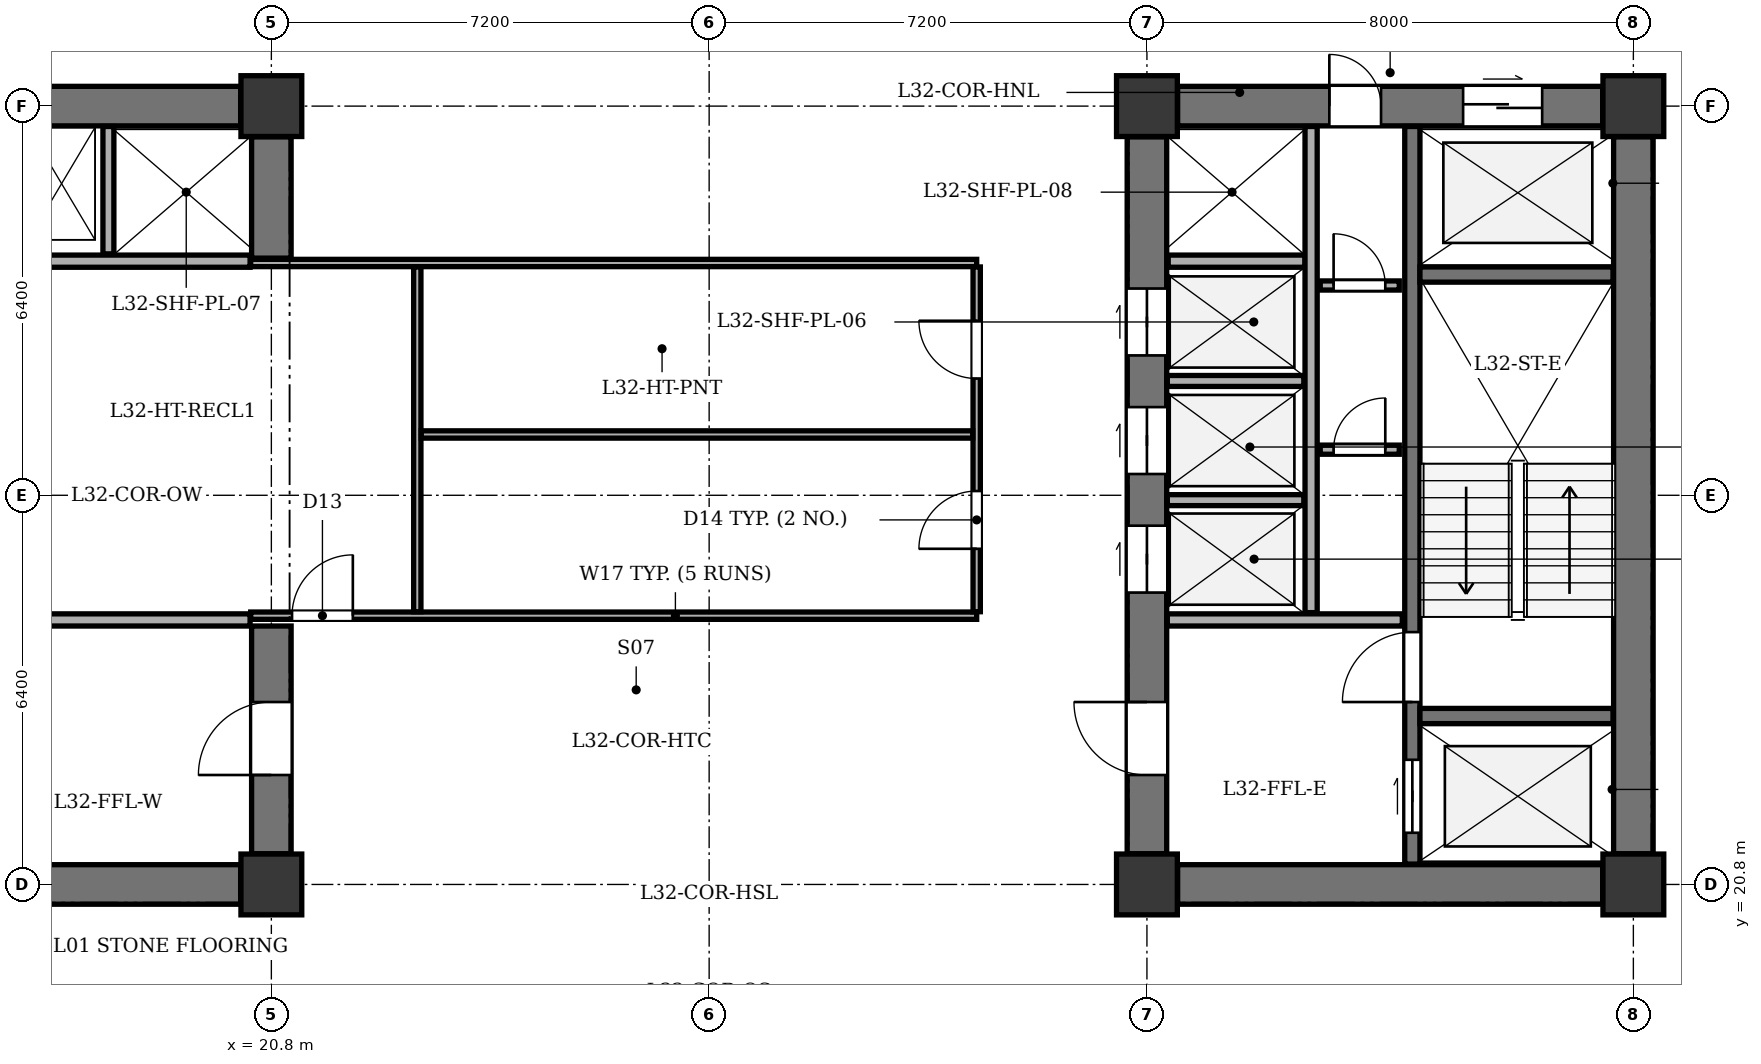
"""IFC4 building model, lengths in metres.
Left out: names, types, materials, properties, quantities, classifications, styles, units other than length and angle.
Written with IfcOpenShell. Run it as: python <this file> out.ifc"""

import sys

from ifc_helpers import new_model, si_unit, direction, frame, frame_2d, origin, origin_2d, place, context, subcontext, project, spatial, rectangle, extrude, element, fill, save


model = new_model("IFC4")
c1 = context("Model", 3, precision=1e-05, world=origin(), true_north=direction((0.0, 1.0)))
c2 = subcontext(c1, "Body", "Model", "MODEL_VIEW")
j1 = project(units=[si_unit("LENGTHUNIT", "METRE"), si_unit("PLANEANGLEUNIT", "RADIAN")], contexts=[c1])
p1 = place(None, origin())
s1 = spatial("IfcSite", under=j1, at=p1, CompositionType="ELEMENT")
p2 = place(p1, origin())
s2 = spatial("IfcBuilding", under=s1, at=p2, CompositionType="ELEMENT")
p3 = place(p2, frame((0.0, 0.0, 130.8)))
s3 = spatial("IfcBuildingStorey", under=s2, at=p3, CompositionType="ELEMENT", Elevation=130.8)
for number, where, z_axis, x_axis in (
    (1, (20.8, 20.8, 0.0), (0.0, 0.0, 1.0), (1.0, 0.0, 0.0)),
    (2, (20.8, 33.6, 0.0), (0.0, 0.0, 1.0), (1.0, 0.0, 0.0)),
    (3, (35.2, 20.8, 0.0), (0.0, 0.0, 1.0), (1.0, 0.0, 0.0)),
    (4, (43.2, 20.8, 0.0), (0.0, 0.0, 1.0), (1.0, 0.0, 0.0)),
    (5, (35.2, 33.6, 0.0), (0.0, 0.0, 1.0), (1.0, 0.0, 0.0)),
    (6, (43.2, 33.6, 0.0), (0.0, 0.0, 1.0), (1.0, 0.0, 0.0)),
):
    element("IfcColumn", number, at=place(p3, frame(where, z_axis=z_axis, x_axis=x_axis)), inside=s3, PredefinedType="COLUMN", context=c2, shape_type="SweptSolid", body=[
        extrude(rectangle(XDim=1.0, YDim=1.0, at=origin_2d()), origin(), (0.0, 0.0, 1.0), 3.5),
    ])
p4 = place(p3, frame((13.305, 20.8, 0.0), z_axis=(0.0, 0.0, 1.0), x_axis=(1.0, 0.0, 0.0)))
e7 = element("IfcWall", 7, at=p4, inside=s3, PredefinedType="SHEAR", context=c2, shape_type="SweptSolid", body=[
    extrude(rectangle(XDim=6.99, YDim=0.65, at=frame_2d((3.495, 0.0))), origin(), (0.0, 0.0, 1.0), 3.2),
])
p5 = place(p3, frame((13.305, 33.6, 0.0), z_axis=(0.0, 0.0, 1.0), x_axis=(1.0, 0.0, 0.0)))
e8 = element("IfcWall", 8, at=p5, inside=s3, PredefinedType="SHEAR", context=c2, shape_type="SweptSolid", body=[
    extrude(rectangle(XDim=6.99, YDim=0.65, at=frame_2d((3.495, 0.0))), origin(), (0.0, 0.0, 1.0), 3.2),
])
p6 = place(p5, frame((0.395, 0.0, 0.0)))
e9 = element("IfcOpeningElement", 9, at=p6, cuts=e8, PredefinedType="OPENING", context=c2, shape_type="SweptSolid", body=[
    extrude(rectangle(XDim=0.85, YDim=2.02, at=frame_2d((0.425, 1.01))), frame((0.0, 0.335, 0.0), z_axis=(0.0, -1.0, 0.0), x_axis=(1.0, 0.0, 0.0)), (0.0, 0.0, 1.0), 0.67),
])
p7 = place(p5, frame((1.695, 0.0, 0.0)))
e10 = element("IfcOpeningElement", 10, at=p7, cuts=e8, PredefinedType="OPENING", context=c2, shape_type="SweptSolid", body=[
    extrude(rectangle(XDim=0.85, YDim=2.02, at=frame_2d((0.425, 1.01))), frame((0.0, 0.335, 0.0), z_axis=(0.0, -1.0, 0.0), x_axis=(1.0, 0.0, 0.0)), (0.0, 0.0, 1.0), 0.67),
])
p8 = place(p3, frame((20.8, 21.305, 0.0), z_axis=(0.0, 0.0, 1.0), x_axis=(0.0, 1.0, 0.0)))
e11 = element("IfcWall", 11, at=p8, inside=s3, PredefinedType="SHEAR", context=c2, shape_type="SweptSolid", body=[
    extrude(rectangle(XDim=3.745, YDim=0.65, at=frame_2d((1.873, 0.0))), origin(), (0.0, 0.0, 1.0), 3.2),
])
p9 = place(p8, frame((1.295, 0.0, 0.0)))
e12 = element("IfcOpeningElement", 12, at=p9, cuts=e11, PredefinedType="OPENING", context=c2, shape_type="SweptSolid", body=[
    extrude(rectangle(XDim=1.2, YDim=2.15, at=frame_2d((0.6, 1.075))), frame((0.0, 0.335, 0.0), z_axis=(0.0, -1.0, 0.0), x_axis=(1.0, 0.0, 0.0)), (0.0, 0.0, 1.0), 0.67),
])
p10 = place(p3, frame((20.8, 31.1, 0.0), z_axis=(0.0, 0.0, 1.0), x_axis=(0.0, 1.0, 0.0)))
e13 = element("IfcWall", 13, at=p10, inside=s3, PredefinedType="SHEAR", context=c2, shape_type="SweptSolid", body=[
    extrude(rectangle(XDim=1.995, YDim=0.65, at=frame_2d((0.998, 0.0))), origin(), (0.0, 0.0, 1.0), 3.2),
])
for number, where, z_axis, x_axis in (
    (14, (16.6, 25.15, 0.0), (0.0, 0.0, 1.0), (1.0, 0.0, 0.0)),
    (15, (16.6, 31.05, 0.0), (0.0, 0.0, 1.0), (1.0, 0.0, 0.0)),
):
    element("IfcWall", number, at=place(p3, frame(where, z_axis=z_axis, x_axis=x_axis)), inside=s3, PredefinedType="SOLIDWALL", context=c2, shape_type="SweptSolid", body=[
        extrude(rectangle(XDim=3.85, YDim=0.2, at=frame_2d((1.925, 0.0))), origin(), (0.0, 0.0, 1.0), 3.2),
    ])
p11 = place(p3, frame((18.12, 31.17, 0.0), z_axis=(0.0, 0.0, 1.0), x_axis=(0.0, 1.0, 0.0)))
e16 = element("IfcWall", 16, at=p11, inside=s3, PredefinedType="PARTITIONING", context=c2, shape_type="SweptSolid", body=[
    extrude(rectangle(XDim=2.095, YDim=0.18, at=frame_2d((1.047, 0.0))), origin(), (0.0, 0.0, 1.0), 3.2),
])
p12 = place(p3, frame((43.2, 21.305, 0.0), z_axis=(0.0, 0.0, 1.0), x_axis=(0.0, 1.0, 0.0)))
e17 = element("IfcWall", 17, at=p12, inside=s3, PredefinedType="SHEAR", context=c2, shape_type="SweptSolid", body=[
    extrude(rectangle(XDim=11.79, YDim=0.65, at=frame_2d((5.895, 0.0))), origin(), (0.0, 0.0, 1.0), 3.2),
])
p13 = place(p3, frame((35.705, 20.8, 0.0), z_axis=(0.0, 0.0, 1.0), x_axis=(1.0, 0.0, 0.0)))
e18 = element("IfcWall", 18, at=p13, inside=s3, PredefinedType="SHEAR", context=c2, shape_type="SweptSolid", body=[
    extrude(rectangle(XDim=6.99, YDim=0.65, at=frame_2d((3.495, 0.0))), origin(), (0.0, 0.0, 1.0), 3.2),
])
p14 = place(p3, frame((35.705, 33.6, 0.0), z_axis=(0.0, 0.0, 1.0), x_axis=(1.0, 0.0, 0.0)))
e19 = element("IfcWall", 19, at=p14, inside=s3, PredefinedType="SHEAR", context=c2, shape_type="SweptSolid", body=[
    extrude(rectangle(XDim=6.99, YDim=0.65, at=frame_2d((3.495, 0.0))), origin(), (0.0, 0.0, 1.0), 3.2),
])
p15 = place(p14, frame((4.695, 0.0, 0.0)))
e20 = element("IfcOpeningElement", 20, at=p15, cuts=e19, PredefinedType="OPENING", context=c2, shape_type="SweptSolid", body=[
    extrude(rectangle(XDim=1.3, YDim=2.15, at=frame_2d((0.65, 1.075))), frame((0.0, 0.335, 0.0), z_axis=(0.0, -1.0, 0.0), x_axis=(1.0, 0.0, 0.0)), (0.0, 0.0, 1.0), 0.67),
])
p16 = place(p14, frame((2.495, 0.0, 0.0)))
e21 = element("IfcOpeningElement", 21, at=p16, cuts=e19, PredefinedType="OPENING", context=c2, shape_type="SweptSolid", body=[
    extrude(rectangle(XDim=0.85, YDim=2.02, at=frame_2d((0.425, 1.01))), frame((0.0, 0.335, 0.0), z_axis=(0.0, -1.0, 0.0), x_axis=(1.0, 0.0, 0.0)), (0.0, 0.0, 1.0), 0.67),
])
p17 = place(p3, frame((35.2, 21.305, 0.0), z_axis=(0.0, 0.0, 1.0), x_axis=(0.0, 1.0, 0.0)))
e22 = element("IfcWall", 22, at=p17, inside=s3, PredefinedType="SHEAR", context=c2, shape_type="SweptSolid", body=[
    extrude(rectangle(XDim=11.79, YDim=0.65, at=frame_2d((5.895, 0.0))), origin(), (0.0, 0.0, 1.0), 3.2),
])
p18 = place(p17, frame((1.295, 0.0, 0.0)))
e23 = element("IfcOpeningElement", 23, at=p18, cuts=e22, PredefinedType="OPENING", context=c2, shape_type="SweptSolid", body=[
    extrude(rectangle(XDim=1.2, YDim=2.15, at=frame_2d((0.6, 1.075))), frame((0.0, 0.335, 0.0), z_axis=(0.0, -1.0, 0.0), x_axis=(1.0, 0.0, 0.0)), (0.0, 0.0, 1.0), 0.67),
])
p19 = place(p17, frame((4.295, 0.0, 0.0)))
e24 = element("IfcOpeningElement", 24, at=p19, cuts=e22, PredefinedType="OPENING", context=c2, shape_type="SweptSolid", body=[
    extrude(rectangle(XDim=1.1, YDim=2.1, at=frame_2d((0.55, 1.05))), frame((0.0, 0.335, 0.0), z_axis=(0.0, -1.0, 0.0), x_axis=(1.0, 0.0, 0.0)), (0.0, 0.0, 1.0), 0.67),
])
p20 = place(p17, frame((6.245, 0.0, 0.0)))
e25 = element("IfcOpeningElement", 25, at=p20, cuts=e22, PredefinedType="OPENING", context=c2, shape_type="SweptSolid", body=[
    extrude(rectangle(XDim=1.1, YDim=2.1, at=frame_2d((0.55, 1.05))), frame((0.0, 0.335, 0.0), z_axis=(0.0, -1.0, 0.0), x_axis=(1.0, 0.0, 0.0)), (0.0, 0.0, 1.0), 0.67),
])
p21 = place(p17, frame((8.195, 0.0, 0.0)))
e26 = element("IfcOpeningElement", 26, at=p21, cuts=e22, PredefinedType="OPENING", context=c2, shape_type="SweptSolid", body=[
    extrude(rectangle(XDim=1.1, YDim=2.1, at=frame_2d((0.55, 1.05))), frame((0.0, 0.335, 0.0), z_axis=(0.0, -1.0, 0.0), x_axis=(1.0, 0.0, 0.0)), (0.0, 0.0, 1.0), 0.67),
])
p22 = place(p3, frame((39.565, 21.135, 0.0), z_axis=(0.0, 0.0, 1.0), x_axis=(0.0, 1.0, 0.0)))
e27 = element("IfcWall", 27, at=p22, inside=s3, PredefinedType="SHEAR", context=c2, shape_type="SweptSolid", body=[
    extrude(rectangle(XDim=12.13, YDim=0.25, at=frame_2d((6.065, 0.0))), origin(), (0.0, 0.0, 1.0), 3.2),
])
p23 = place(p22, frame((0.515, 0.0, 0.0)))
e28 = element("IfcOpeningElement", 28, at=p23, cuts=e27, PredefinedType="OPENING", context=c2, shape_type="SweptSolid", body=[
    extrude(rectangle(XDim=1.2, YDim=2.15, at=frame_2d((0.6, 1.075))), frame((0.0, 0.135, 0.0), z_axis=(0.0, -1.0, 0.0), x_axis=(1.0, 0.0, 0.0)), (0.0, 0.0, 1.0), 0.27),
])
p24 = place(p22, frame((2.665, 0.0, 0.0)))
e29 = element("IfcOpeningElement", 29, at=p24, cuts=e27, PredefinedType="OPENING", context=c2, shape_type="SweptSolid", body=[
    extrude(rectangle(XDim=1.15, YDim=2.15, at=frame_2d((0.575, 1.075))), frame((0.0, 0.135, 0.0), z_axis=(0.0, -1.0, 0.0), x_axis=(1.0, 0.0, 0.0)), (0.0, 0.0, 1.0), 0.27),
])
for number, where, z_axis, x_axis in (
    (30, (39.69, 23.57, 0.0), (0.0, 0.0, 1.0), (1.0, 0.0, 0.0)),
    (31, (39.69, 30.83, 0.0), (0.0, 0.0, 1.0), (1.0, 0.0, 0.0)),
):
    element("IfcWall", number, at=place(p3, frame(where, z_axis=z_axis, x_axis=x_axis)), inside=s3, PredefinedType="SHEAR", context=c2, shape_type="SweptSolid", body=[
        extrude(rectangle(XDim=3.175, YDim=0.25, at=frame_2d((1.587, 0.0))), origin(), (0.0, 0.0, 1.0), 3.2),
    ])
p25 = place(p3, frame((35.535, 25.15, 0.0), z_axis=(0.0, 0.0, 1.0), x_axis=(1.0, 0.0, 0.0)))
e32 = element("IfcWall", 32, at=p25, inside=s3, PredefinedType="SOLIDWALL", context=c2, shape_type="SweptSolid", body=[
    extrude(rectangle(XDim=3.865, YDim=0.2, at=frame_2d((1.933, 0.0))), origin(), (0.0, 0.0, 1.0), 3.2),
])
p26 = place(p3, frame((35.55, 31.05, 0.0), z_axis=(0.0, 0.0, 1.0), x_axis=(1.0, 0.0, 0.0)))
e33 = element("IfcWall", 33, at=p26, inside=s3, PredefinedType="SOLIDWALL", context=c2, shape_type="SweptSolid", body=[
    extrude(rectangle(XDim=2.25, YDim=0.2, at=frame_2d((1.125, 0.0))), origin(), (0.0, 0.0, 1.0), 3.2),
])
p27 = place(p3, frame((37.9, 25.27, 0.0), z_axis=(0.0, 0.0, 1.0), x_axis=(0.0, 1.0, 0.0)))
e34 = element("IfcWall", 34, at=p27, inside=s3, PredefinedType="SOLIDWALL", context=c2, shape_type="SweptSolid", body=[
    extrude(rectangle(XDim=7.995, YDim=0.2, at=frame_2d((3.998, 0.0))), origin(), (0.0, 0.0, 1.0), 3.2),
])
for number, where, z_axis, x_axis in (
    (35, (35.535, 27.12, 0.0), (0.0, 0.0, 1.0), (1.0, 0.0, 0.0)),
    (36, (35.535, 29.08, 0.0), (0.0, 0.0, 1.0), (1.0, 0.0, 0.0)),
):
    element("IfcWall", number, at=place(p3, frame(where, z_axis=z_axis, x_axis=x_axis)), inside=s3, PredefinedType="PARTITIONING", context=c2, shape_type="SweptSolid", body=[
        extrude(rectangle(XDim=2.245, YDim=0.18, at=frame_2d((1.123, 0.0))), origin(), (0.0, 0.0, 1.0), 3.2),
    ])
p28 = place(p3, frame((38.05, 27.95, 0.0), z_axis=(0.0, 0.0, 1.0), x_axis=(1.0, 0.0, 0.0)))
e37 = element("IfcWall", 37, at=p28, inside=s3, PredefinedType="PARTITIONING", context=c2, shape_type="SweptSolid", body=[
    extrude(rectangle(XDim=1.3, YDim=0.15, at=frame_2d((0.65, 0.0))), origin(), (0.0, 0.0, 1.0), 3.2),
])
p29 = place(p28, frame((0.22, 0.0, 0.0)))
e38 = element("IfcOpeningElement", 38, at=p29, cuts=e37, PredefinedType="OPENING", context=c2, shape_type="SweptSolid", body=[
    extrude(rectangle(XDim=0.85, YDim=2.02, at=frame_2d((0.425, 1.01))), frame((0.0, 0.085, 0.0), z_axis=(0.0, -1.0, 0.0), x_axis=(1.0, 0.0, 0.0)), (0.0, 0.0, 1.0), 0.17),
])
p30 = place(p3, frame((38.05, 30.65, 0.0), z_axis=(0.0, 0.0, 1.0), x_axis=(1.0, 0.0, 0.0)))
e39 = element("IfcWall", 39, at=p30, inside=s3, PredefinedType="PARTITIONING", context=c2, shape_type="SweptSolid", body=[
    extrude(rectangle(XDim=1.3, YDim=0.15, at=frame_2d((0.65, 0.0))), origin(), (0.0, 0.0, 1.0), 3.2),
])
p31 = place(p30, frame((0.22, 0.0, 0.0)))
e40 = element("IfcOpeningElement", 40, at=p31, cuts=e39, PredefinedType="OPENING", context=c2, shape_type="SweptSolid", body=[
    extrude(rectangle(XDim=0.85, YDim=2.02, at=frame_2d((0.425, 1.01))), frame((0.0, 0.085, 0.0), z_axis=(0.0, -1.0, 0.0), x_axis=(1.0, 0.0, 0.0)), (0.0, 0.0, 1.0), 0.17),
])
p32 = place(p3, frame((20.46, 25.22, 0.0), z_axis=(0.0, 0.0, 1.0), x_axis=(1.0, 0.0, 0.0)))
e41 = element("IfcWall", 41, at=p32, inside=s3, PredefinedType="PARTITIONING", context=c2, shape_type="SweptSolid", body=[
    extrude(rectangle(XDim=11.94, YDim=0.12, at=frame_2d((5.97, 0.0))), origin(), (0.0, 0.0, 1.0), 3.2),
])
p33 = place(p32, frame((0.68, 0.0, 0.0)))
e42 = element("IfcOpeningElement", 42, at=p33, cuts=e41, PredefinedType="OPENING", context=c2, shape_type="SweptSolid", body=[
    extrude(rectangle(XDim=1.0, YDim=2.1, at=frame_2d((0.5, 1.05))), frame((0.0, 0.07, 0.0), z_axis=(0.0, -1.0, 0.0), x_axis=(1.0, 0.0, 0.0)), (0.0, 0.0, 1.0), 0.14),
])
p34 = place(p3, frame((20.46, 31.02, 0.0), z_axis=(0.0, 0.0, 1.0), x_axis=(1.0, 0.0, 0.0)))
e43 = element("IfcWall", 43, at=p34, inside=s3, PredefinedType="PARTITIONING", context=c2, shape_type="SweptSolid", body=[
    extrude(rectangle(XDim=11.94, YDim=0.12, at=frame_2d((5.97, 0.0))), origin(), (0.0, 0.0, 1.0), 3.2),
])
p35 = place(p3, frame((32.4, 25.285, 0.0), z_axis=(0.0, 0.0, 1.0), x_axis=(0.0, 1.0, 0.0)))
e44 = element("IfcWall", 44, at=p35, inside=s3, PredefinedType="PARTITIONING", context=c2, shape_type="SweptSolid", body=[
    extrude(rectangle(XDim=5.67, YDim=0.12, at=frame_2d((2.835, 0.0))), origin(), (0.0, 0.0, 1.0), 3.2),
])
p36 = place(p35, frame((1.035, 0.0, 0.0)))
e45 = element("IfcOpeningElement", 45, at=p36, cuts=e44, PredefinedType="OPENING", context=c2, shape_type="SweptSolid", body=[
    extrude(rectangle(XDim=0.95, YDim=2.1, at=frame_2d((0.475, 1.05))), frame((0.0, 0.07, 0.0), z_axis=(0.0, -1.0, 0.0), x_axis=(1.0, 0.0, 0.0)), (0.0, 0.0, 1.0), 0.14),
])
p37 = place(p35, frame((3.835, 0.0, 0.0)))
e46 = element("IfcOpeningElement", 46, at=p37, cuts=e44, PredefinedType="OPENING", context=c2, shape_type="SweptSolid", body=[
    extrude(rectangle(XDim=0.95, YDim=2.1, at=frame_2d((0.475, 1.05))), frame((0.0, 0.07, 0.0), z_axis=(0.0, -1.0, 0.0), x_axis=(1.0, 0.0, 0.0)), (0.0, 0.0, 1.0), 0.14),
])
p38 = place(p3, frame((23.2, 25.285, 0.0), z_axis=(0.0, 0.0, 1.0), x_axis=(0.0, 1.0, 0.0)))
e47 = element("IfcWall", 47, at=p38, inside=s3, PredefinedType="PARTITIONING", context=c2, shape_type="SweptSolid", body=[
    extrude(rectangle(XDim=5.67, YDim=0.12, at=frame_2d((2.835, 0.0))), origin(), (0.0, 0.0, 1.0), 3.2),
])
p39 = place(p3, frame((23.265, 28.2, 0.0), z_axis=(0.0, 0.0, 1.0), x_axis=(1.0, 0.0, 0.0)))
e48 = element("IfcWall", 48, at=p39, inside=s3, PredefinedType="PARTITIONING", context=c2, shape_type="SweptSolid", body=[
    extrude(rectangle(XDim=9.07, YDim=0.12, at=frame_2d((4.535, 0.0))), origin(), (0.0, 0.0, 1.0), 3.2),
])
p40 = place(p9, origin())
e49 = element("IfcDoor", 49, at=p40, inside=s3, OperationType="SINGLE_SWING_LEFT", PredefinedType="DOOR", context=c2, shape_type="SweptSolid", body=[
    extrude(rectangle(XDim=1.2, YDim=2.15, at=frame_2d((0.6, 1.075))), frame((0.0, 0.025, 0.0), z_axis=(0.0, -1.0, 0.0), x_axis=(1.0, 0.0, 0.0)), (0.0, 0.0, 1.0), 0.05),
])
fill(e12, e49)
p41 = place(p15, origin())
e50 = element("IfcDoor", 50, at=p41, inside=s3, OperationType="DOUBLE_DOOR_SLIDING", PredefinedType="DOOR", context=c2, shape_type="SweptSolid", body=[
    extrude(rectangle(XDim=1.3, YDim=2.15, at=frame_2d((0.65, 1.075))), frame((0.0, 0.025, 0.0), z_axis=(0.0, -1.0, 0.0), x_axis=(1.0, 0.0, 0.0)), (0.0, 0.0, 1.0), 0.05),
])
fill(e20, e50)
p42 = place(p16, origin())
e51 = element("IfcDoor", 51, at=p42, inside=s3, OperationType="SINGLE_SWING_LEFT", PredefinedType="DOOR", context=c2, shape_type="SweptSolid", body=[
    extrude(rectangle(XDim=0.85, YDim=2.02, at=frame_2d((0.425, 1.01))), frame((0.0, 0.025, 0.0), z_axis=(0.0, -1.0, 0.0), x_axis=(1.0, 0.0, 0.0)), (0.0, 0.0, 1.0), 0.05),
])
fill(e21, e51)
p43 = place(p18, origin())
e52 = element("IfcDoor", 52, at=p43, inside=s3, OperationType="SINGLE_SWING_RIGHT", PredefinedType="DOOR", context=c2, shape_type="SweptSolid", body=[
    extrude(rectangle(XDim=1.2, YDim=2.15, at=frame_2d((0.6, 1.075))), frame((0.0, 0.025, 0.0), z_axis=(0.0, -1.0, 0.0), x_axis=(1.0, 0.0, 0.0)), (0.0, 0.0, 1.0), 0.05),
])
fill(e23, e52)
p44 = place(p19, origin())
e53 = element("IfcDoor", 53, at=p44, inside=s3, OperationType="DOUBLE_DOOR_SLIDING", PredefinedType="DOOR", context=c2, shape_type="SweptSolid", body=[
    extrude(rectangle(XDim=1.1, YDim=2.1, at=frame_2d((0.55, 1.05))), frame((0.0, 0.025, 0.0), z_axis=(0.0, -1.0, 0.0), x_axis=(1.0, 0.0, 0.0)), (0.0, 0.0, 1.0), 0.05),
])
fill(e24, e53)
p45 = place(p20, origin())
e54 = element("IfcDoor", 54, at=p45, inside=s3, OperationType="DOUBLE_DOOR_SLIDING", PredefinedType="DOOR", context=c2, shape_type="SweptSolid", body=[
    extrude(rectangle(XDim=1.1, YDim=2.1, at=frame_2d((0.55, 1.05))), frame((0.0, 0.025, 0.0), z_axis=(0.0, -1.0, 0.0), x_axis=(1.0, 0.0, 0.0)), (0.0, 0.0, 1.0), 0.05),
])
fill(e25, e54)
p46 = place(p21, origin())
e55 = element("IfcDoor", 55, at=p46, inside=s3, OperationType="DOUBLE_DOOR_SLIDING", PredefinedType="DOOR", context=c2, shape_type="SweptSolid", body=[
    extrude(rectangle(XDim=1.1, YDim=2.1, at=frame_2d((0.55, 1.05))), frame((0.0, 0.025, 0.0), z_axis=(0.0, -1.0, 0.0), x_axis=(1.0, 0.0, 0.0)), (0.0, 0.0, 1.0), 0.05),
])
fill(e26, e55)
p47 = place(p23, origin())
e56 = element("IfcDoor", 56, at=p47, inside=s3, OperationType="DOUBLE_DOOR_SLIDING", PredefinedType="DOOR", context=c2, shape_type="SweptSolid", body=[
    extrude(rectangle(XDim=1.2, YDim=2.15, at=frame_2d((0.6, 1.075))), frame((0.0, 0.025, 0.0), z_axis=(0.0, -1.0, 0.0), x_axis=(1.0, 0.0, 0.0)), (0.0, 0.0, 1.0), 0.05),
])
fill(e28, e56)
p48 = place(p24, origin())
e57 = element("IfcDoor", 57, at=p48, inside=s3, OperationType="SINGLE_SWING_LEFT", PredefinedType="DOOR", context=c2, shape_type="SweptSolid", body=[
    extrude(rectangle(XDim=1.15, YDim=2.15, at=frame_2d((0.575, 1.075))), frame((0.0, 0.025, 0.0), z_axis=(0.0, -1.0, 0.0), x_axis=(1.0, 0.0, 0.0)), (0.0, 0.0, 1.0), 0.05),
])
fill(e29, e57)
p49 = place(p29, origin())
e58 = element("IfcDoor", 58, at=p49, inside=s3, OperationType="SINGLE_SWING_RIGHT", PredefinedType="DOOR", context=c2, shape_type="SweptSolid", body=[
    extrude(rectangle(XDim=0.85, YDim=2.02, at=frame_2d((0.425, 1.01))), frame((0.0, 0.025, 0.0), z_axis=(0.0, -1.0, 0.0), x_axis=(1.0, 0.0, 0.0)), (0.0, 0.0, 1.0), 0.05),
])
fill(e38, e58)
p50 = place(p31, origin())
e59 = element("IfcDoor", 59, at=p50, inside=s3, OperationType="SINGLE_SWING_LEFT", PredefinedType="DOOR", context=c2, shape_type="SweptSolid", body=[
    extrude(rectangle(XDim=0.85, YDim=2.02, at=frame_2d((0.425, 1.01))), frame((0.0, 0.025, 0.0), z_axis=(0.0, -1.0, 0.0), x_axis=(1.0, 0.0, 0.0)), (0.0, 0.0, 1.0), 0.05),
])
fill(e40, e59)
p51 = place(p33, origin())
e60 = element("IfcDoor", 60, at=p51, inside=s3, OperationType="SINGLE_SWING_RIGHT", PredefinedType="DOOR", context=c2, shape_type="SweptSolid", body=[
    extrude(rectangle(XDim=1.0, YDim=2.1, at=frame_2d((0.5, 1.05))), frame((0.0, 0.025, 0.0), z_axis=(0.0, -1.0, 0.0), x_axis=(1.0, 0.0, 0.0)), (0.0, 0.0, 1.0), 0.05),
])
fill(e42, e60)
p52 = place(p36, origin())
e61 = element("IfcDoor", 61, at=p52, inside=s3, OperationType="SINGLE_SWING_LEFT", PredefinedType="DOOR", context=c2, shape_type="SweptSolid", body=[
    extrude(rectangle(XDim=0.95, YDim=2.1, at=frame_2d((0.475, 1.05))), frame((0.0, 0.025, 0.0), z_axis=(0.0, -1.0, 0.0), x_axis=(1.0, 0.0, 0.0)), (0.0, 0.0, 1.0), 0.05),
])
fill(e45, e61)
p53 = place(p37, origin())
e62 = element("IfcDoor", 62, at=p53, inside=s3, OperationType="SINGLE_SWING_RIGHT", PredefinedType="DOOR", context=c2, shape_type="SweptSolid", body=[
    extrude(rectangle(XDim=0.95, YDim=2.1, at=frame_2d((0.475, 1.05))), frame((0.0, 0.025, 0.0), z_axis=(0.0, -1.0, 0.0), x_axis=(1.0, 0.0, 0.0)), (0.0, 0.0, 1.0), 0.05),
])
fill(e46, e62)
save(model, sys.argv[1])
